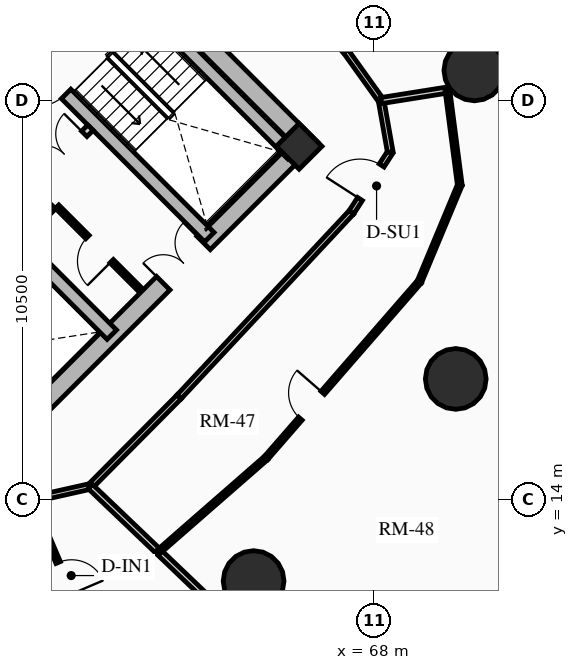
"""IFC4 building model, lengths in metres.
Left out: names, types, materials, properties, quantities, classifications, styles, units other than length and angle.
Written with IfcOpenShell. Run it as: python <this file> out.ifc"""

import sys

from ifc_helpers import new_model, si_unit, direction, frame, frame_2d, origin, origin_2d, place, context, subcontext, project, spatial, rectangle, circle, extrude, source, transform, mapped, element, fill, save


model = new_model("IFC4")
c1 = context("Model", 3, precision=1e-05, world=origin(), true_north=direction((0.0, 1.0)))
c2 = subcontext(c1, "Body", "Model", "MODEL_VIEW")
j1 = project(units=[si_unit("LENGTHUNIT", "METRE"), si_unit("PLANEANGLEUNIT", "RADIAN")], contexts=[c1])
p1 = place(None, origin())
s1 = spatial("IfcSite", under=j1, at=p1, CompositionType="ELEMENT")
p2 = place(p1, origin())
s2 = spatial("IfcBuilding", under=s1, at=p2, CompositionType="ELEMENT")
p3 = place(p2, frame((0.0, 0.0, 48.19)))
s3 = spatial("IfcBuildingStorey", under=s2, at=p3, CompositionType="ELEMENT", Elevation=48.19)
p4 = place(p3, frame((66.339, 23.227, 0.0), z_axis=(0.0, 0.0, 1.0), x_axis=(-0.707106781187, 0.707106781187, 0.0)))
e1 = element("IfcWall", 1, at=p4, inside=s3, PredefinedType="SHEAR", context=c2, shape_type="SweptSolid", body=[
    extrude(rectangle(XDim=14.3, YDim=0.5, at=frame_2d((7.15, 0.0))), origin(), (0.0, 0.0, 1.0), 2.91),
])
p5 = place(p3, frame((58.596, 15.838, 0.0), z_axis=(0.0, 0.0, 1.0), x_axis=(0.707106781187, 0.707106781187, 0.0)))
e2 = element("IfcWall", 2, at=p5, inside=s3, PredefinedType="SHEAR", context=c2, shape_type="SweptSolid", body=[
    extrude(rectangle(XDim=10.7, YDim=0.5, at=frame_2d((5.35, 0.0))), origin(), (0.0, 0.0, 1.0), 2.91),
])
m1 = source(origin(), c2, "Body", "SweptSolid", [
    extrude(rectangle(XDim=1.5, YDim=2.02, at=frame_2d((0.75, 1.01))), frame((0.0, 0.26, 0.0), z_axis=(0.0, -1.0, 0.0), x_axis=(1.0, 0.0, 0.0)), (0.0, 0.0, 1.0), 0.52),
])
p6 = place(p5, frame((5.45, 0.0, 0.0)))
e3 = element("IfcOpeningElement", 3, at=p6, cuts=e2, PredefinedType="OPENING", context=c2, shape_type="MappedRepresentation", body=[
    mapped(m1, transform((0.0, 0.0, 0.0), x_axis=(1.0, 0.0, 0.0), y_axis=(0.0, 1.0, 0.0), z_axis=(0.0, 0.0, 1.0), scale=1.0)),
])
p7 = place(p3, frame((61.096, 18.338, 0.0), z_axis=(0.0, 0.0, 1.0), x_axis=(-0.707106781187, 0.707106781187, 0.0)))
e4 = element("IfcWall", 4, at=p7, inside=s3, PredefinedType="SHEAR", context=c2, shape_type="SweptSolid", body=[
    extrude(rectangle(XDim=13.8, YDim=0.35, at=frame_2d((6.9, 0.0))), origin(), (0.0, 0.0, 1.0), 2.91),
])
m2 = source(origin(), c2, "Body", "SweptSolid", [
    extrude(rectangle(XDim=1.1, YDim=2.015, at=frame_2d((0.55, 1.007))), frame((0.0, 0.185, 0.0), z_axis=(0.0, -1.0, 0.0), x_axis=(1.0, 0.0, 0.0)), (0.0, 0.0, 1.0), 0.37),
])
p8 = place(p7, frame((4.9, 0.0, 0.0)))
e5 = element("IfcOpeningElement", 5, at=p8, cuts=e4, PredefinedType="OPENING", context=c2, shape_type="MappedRepresentation", body=[
    mapped(m2, transform((0.0, 0.0, 0.0), x_axis=(1.0, 0.0, 0.0), y_axis=(0.0, 1.0, 0.0), z_axis=(0.0, 0.0, 1.0), scale=1.0)),
])
m3 = source(origin(), c2, "Body", "SweptSolid", [
    extrude(rectangle(XDim=1.15, YDim=2.02, at=frame_2d((0.575, 1.01))), frame((0.0, 0.185, 0.0), z_axis=(0.0, -1.0, 0.0), x_axis=(1.0, 0.0, 0.0)), (0.0, 0.0, 1.0), 0.37),
])
p9 = place(p7, frame((7.32, 0.0, 0.0)))
e6 = element("IfcOpeningElement", 6, at=p9, cuts=e4, PredefinedType="OPENING", context=c2, shape_type="MappedRepresentation", body=[
    mapped(m3, transform((0.0, 0.0, 0.0), x_axis=(1.0, 0.0, 0.0), y_axis=(0.0, 1.0, 0.0), z_axis=(0.0, 0.0, 1.0), scale=1.0)),
])
p10 = place(p3, frame((63.662, 20.904, 0.0), z_axis=(0.0, 0.0, 1.0), x_axis=(-0.707106781187, 0.707106781187, 0.0)))
e7 = element("IfcWall", 7, at=p10, inside=s3, PredefinedType="SHEAR", context=c2, shape_type="SweptSolid", body=[
    extrude(rectangle(XDim=13.8, YDim=0.35, at=frame_2d((6.9, 0.0))), origin(), (0.0, 0.0, 1.0), 2.91),
])
p11 = place(p10, frame((10.025, 0.0, 0.0)))
e8 = element("IfcOpeningElement", 8, at=p11, cuts=e7, PredefinedType="OPENING", context=c2, shape_type="MappedRepresentation", body=[
    mapped(m2, transform((0.0, 0.0, 0.0), x_axis=(1.0, 0.0, 0.0), y_axis=(0.0, 1.0, 0.0), z_axis=(0.0, 0.0, 1.0), scale=1.0)),
])
p12 = place(p10, frame((12.025, 0.0, 0.0)))
e9 = element("IfcOpeningElement", 9, at=p12, cuts=e7, PredefinedType="OPENING", context=c2, shape_type="MappedRepresentation", body=[
    mapped(m2, transform((0.0, 0.0, 0.0), x_axis=(1.0, 0.0, 0.0), y_axis=(0.0, 1.0, 0.0), z_axis=(0.0, 0.0, 1.0), scale=1.0)),
])
p13 = place(p10, frame((5.33, 0.0, 0.0)))
e10 = element("IfcOpeningElement", 10, at=p13, cuts=e7, PredefinedType="OPENING", context=c2, shape_type="MappedRepresentation", body=[
    mapped(m3, transform((0.0, 0.0, 0.0), x_axis=(1.0, 0.0, 0.0), y_axis=(0.0, 1.0, 0.0), z_axis=(0.0, 0.0, 1.0), scale=1.0)),
])
p14 = place(p3, frame((65.847, 23.089, 0.0), z_axis=(0.0, 0.0, 1.0), x_axis=(-0.707106781187, 0.707106781187, 0.0)))
e11 = element("IfcWall", 11, at=p14, inside=s3, PredefinedType="SHEAR", context=c2, shape_type="SweptSolid", body=[
    extrude(rectangle(XDim=6.745, YDim=0.35, at=frame_2d((3.373, 0.0))), origin(), (0.0, 0.0, 1.0), 2.91),
])
p15 = place(p3, frame((58.893, 25.674, 0.0), z_axis=(0.0, 0.0, 1.0), x_axis=(0.707106781187, 0.707106781187, 0.0)))
e12 = element("IfcWall", 12, at=p15, inside=s3, PredefinedType="SHEAR", context=c2, shape_type="SweptSolid", body=[
    extrude(rectangle(XDim=3.285, YDim=0.35, at=frame_2d((1.643, 0.0))), origin(), (0.0, 0.0, 1.0), 2.91),
])
p16 = place(p3, frame((66.024, 23.294, 0.0), z_axis=(0.0, 0.0, 1.0), x_axis=(0.707106781187, 0.707106781187, 0.0)))
e13 = element("IfcColumn", 13, at=p16, inside=s3, PredefinedType="COLUMN", context=c2, shape_type="SweptSolid", body=[
    extrude(rectangle(XDim=0.85, YDim=0.85, at=origin_2d()), origin(), (0.0, 0.0, 1.0), 2.91),
])
for number, where, z_axis, x_axis in (
    (14, (64.827, 11.854, 0.0), (0.0, 0.0, 1.0), (1.0, 0.0, 0.0)),
    (15, (70.146, 17.173, 0.0), (0.0, 0.0, 1.0), (1.0, 0.0, 0.0)),
    (16, (70.635, 25.291, 0.0), (0.0, 0.0, 1.0), (1.0, 0.0, 0.0)),
):
    element("IfcColumn", number, at=place(p3, frame(where, z_axis=z_axis, x_axis=x_axis)), inside=s3, PredefinedType="USERDEFINED", context=c2, shape_type="SweptSolid", body=[
        extrude(circle(Radius=0.8, at=origin_2d()), origin(), (0.0, 0.0, 1.0), 2.91),
    ])
p17 = place(p3, frame((73.814, 15.031, 0.0), z_axis=(0.0, 0.0, 1.0), x_axis=(-0.559638693991, -0.828736708604, 0.0)))
e17 = element("IfcWall", 17, at=p17, inside=s3, PredefinedType="SOLIDWALL", context=c2, shape_type="SweptSolid", body=[
    extrude(rectangle(XDim=4.93, YDim=0.24, at=frame_2d((2.465, 0.0))), origin(), (0.0, 0.0, 1.0), 2.073),
])
m4 = source(origin(), c2, "Body", "SweptSolid", [
    extrude(rectangle(XDim=1.9, YDim=1.35, at=frame_2d((0.95, 0.675))), frame((0.0, 0.13, 0.0), z_axis=(0.0, -1.0, 0.0), x_axis=(1.0, 0.0, 0.0)), (0.0, 0.0, 1.0), 0.26),
])
p18 = place(p17, frame((1.515, 0.0, 0.65)))
e18 = element("IfcOpeningElement", 18, at=p18, cuts=e17, PredefinedType="OPENING", context=c2, shape_type="MappedRepresentation", body=[
    mapped(m4, transform((0.0, 0.0, 0.0), x_axis=(1.0, 0.0, 0.0), y_axis=(0.0, 1.0, 0.0), z_axis=(0.0, 0.0, 1.0), scale=1.0)),
])
p19 = place(p3, frame((58.214, 21.467, 0.0), z_axis=(0.0, 0.0, 1.0), x_axis=(0.707106781187, 0.707106781187, 0.0)))
e19 = element("IfcWall", 19, at=p19, inside=s3, PredefinedType="PARTITIONING", context=c2, shape_type="SweptSolid", body=[
    extrude(rectangle(XDim=3.28, YDim=0.2, at=frame_2d((1.64, 0.0))), origin(), (0.0, 0.0, 1.0), 2.635),
])
m5 = source(origin(), c2, "Body", "SweptSolid", [
    extrude(rectangle(XDim=1.5, YDim=2.02, at=frame_2d((0.75, 1.01))), frame((0.0, 0.11, 0.0), z_axis=(0.0, -1.0, 0.0), x_axis=(1.0, 0.0, 0.0)), (0.0, 0.0, 1.0), 0.22),
])
p20 = place(p19, frame((1.55, 0.0, 0.0)))
e20 = element("IfcOpeningElement", 20, at=p20, cuts=e19, PredefinedType="OPENING", context=c2, shape_type="MappedRepresentation", body=[
    mapped(m5, transform((0.0, 0.0, 0.0), x_axis=(1.0, 0.0, 0.0), y_axis=(0.0, 1.0, 0.0), z_axis=(0.0, 0.0, 1.0), scale=1.0)),
])
p21 = place(p3, frame((61.835, 19.529, 0.0), z_axis=(0.0, 0.0, 1.0), x_axis=(-0.707146413884, 0.707067146267, 0.0)))
e21 = element("IfcWall", 21, at=p21, inside=s3, PredefinedType="PARTITIONING", context=c2, shape_type="SweptSolid", body=[
    extrude(rectangle(XDim=3.08, YDim=0.125, at=frame_2d((1.54, 0.0))), origin(), (0.0, 0.0, 1.0), 2.635),
])
m6 = source(origin(), c2, "Body", "SweptSolid", [
    extrude(rectangle(XDim=0.9, YDim=2.005, at=frame_2d((0.45, 1.002))), frame((0.0, 0.073, 0.0), z_axis=(0.0, -1.0, 0.0), x_axis=(1.0, 0.0, 0.0)), (0.0, 0.0, 1.0), 0.145),
])
p22 = place(p21, frame((1.05, 0.0, 0.0)))
e22 = element("IfcOpeningElement", 22, at=p22, cuts=e21, PredefinedType="OPENING", context=c2, shape_type="MappedRepresentation", body=[
    mapped(m6, transform((0.0, 0.0, 0.0), x_axis=(1.0, 0.0, 0.0), y_axis=(0.0, 1.0, 0.0), z_axis=(0.0, 0.0, 1.0), scale=1.0)),
])
p23 = place(p3, frame((58.794, 20.915, 0.0), z_axis=(0.0, 0.0, 1.0), x_axis=(0.707106781187, 0.707106781187, 0.0)))
e23 = element("IfcWall", 23, at=p23, inside=s3, PredefinedType="PARTITIONING", context=c2, shape_type="SweptSolid", body=[
    extrude(rectangle(XDim=1.1, YDim=0.125, at=frame_2d((0.55, 0.0))), origin(), (0.0, 0.0, 1.0), 2.635),
])
p24 = place(p3, frame((58.975, 13.996, 0.0), z_axis=(0.0, 0.0, 1.0), x_axis=(0.975700857392, 0.219106907431, 0.0)))
e24 = element("IfcWall", 24, at=p24, inside=s3, PredefinedType="PARTITIONING", context=c2, shape_type="SweptSolid", body=[
    extrude(rectangle(XDim=1.591, YDim=0.15, at=frame_2d((0.795, 0.0))), origin(), (0.0, 0.0, 1.0), 2.205),
])
p25 = place(p3, frame((60.528, 14.344, 0.0), z_axis=(0.0, 0.0, 1.0), x_axis=(0.704381645997, 0.709821454158, 0.0)))
e25 = element("IfcWall", 25, at=p25, inside=s3, PredefinedType="PARTITIONING", context=c2, shape_type="SweptSolid", body=[
    extrude(rectangle(XDim=3.321, YDim=0.15, at=frame_2d((1.661, 0.0))), origin(), (0.0, 0.0, 1.0), 2.159),
])
p26 = place(p3, frame((62.867, 16.702, 0.0), z_axis=(0.0, 0.0, 1.0), x_axis=(0.682449206191, 0.73093302085, 0.0)))
e26 = element("IfcWall", 26, at=p26, inside=s3, PredefinedType="PARTITIONING", context=c2, shape_type="SweptSolid", body=[
    extrude(rectangle(XDim=6.642, YDim=0.15, at=frame_2d((3.321, 0.0))), origin(), (0.0, 0.0, 1.0), 2.159),
])
p27 = place(p3, frame((67.4, 21.556, 0.0), z_axis=(0.0, 0.0, 1.0), x_axis=(0.542247692187, 0.840218686009, 0.0)))
e27 = element("IfcWall", 27, at=p27, inside=s3, PredefinedType="PARTITIONING", context=c2, shape_type="SweptSolid", body=[
    extrude(rectangle(XDim=1.887, YDim=0.15, at=frame_2d((0.943, 0.0))), origin(), (0.0, 0.0, 1.0), 2.205),
])
m7 = source(origin(), c2, "Body", "SweptSolid", [
    extrude(rectangle(XDim=1.05, YDim=2.015, at=frame_2d((0.525, 1.007))), frame((0.0, 0.085, 0.0), z_axis=(0.0, -1.0, 0.0), x_axis=(1.0, 0.0, 0.0)), (0.0, 0.0, 1.0), 0.17),
])
p28 = place(p27, frame((0.419, 0.0, 0.0)))
e28 = element("IfcOpeningElement", 28, at=p28, cuts=e27, PredefinedType="OPENING", context=c2, shape_type="MappedRepresentation", body=[
    mapped(m7, transform((0.0, 0.0, 0.0), x_axis=(1.0, 0.0, 0.0), y_axis=(0.0, 1.0, 0.0), z_axis=(0.0, 0.0, 1.0), scale=1.0)),
])
p29 = place(p3, frame((68.423, 23.142, 0.0), z_axis=(0.0, 0.0, 1.0), x_axis=(-0.174796562349, 0.984604571283, 0.0)))
e29 = element("IfcWall", 29, at=p29, inside=s3, PredefinedType="PARTITIONING", context=c2, shape_type="SweptSolid", body=[
    extrude(rectangle(XDim=1.377, YDim=0.15, at=frame_2d((0.688, 0.0))), origin(), (0.0, 0.0, 1.0), 2.159),
])
p30 = place(p3, frame((68.182, 24.498, 0.0), z_axis=(0.0, 0.0, 1.0), x_axis=(-0.582532339525, 0.812807525437, 0.0)))
e30 = element("IfcWall", 30, at=p30, inside=s3, PredefinedType="PARTITIONING", context=c2, shape_type="SweptSolid", body=[
    extrude(rectangle(XDim=1.605, YDim=0.15, at=frame_2d((0.803, 0.0))), origin(), (0.0, 0.0, 1.0), 2.205),
])
p31 = place(p3, frame((67.247, 25.802, 0.0), z_axis=(0.0, 0.0, 1.0), x_axis=(-0.696771261687, 0.71729339108, 0.0)))
e31 = element("IfcWall", 31, at=p31, inside=s3, PredefinedType="PARTITIONING", context=c2, shape_type="SweptSolid", body=[
    extrude(rectangle(XDim=5.972, YDim=0.15, at=frame_2d((2.986, 0.0))), origin(), (0.0, 0.0, 1.0), 2.635),
])
m8 = source(origin(), c2, "Body", "SweptSolid", [
    extrude(rectangle(XDim=1.0, YDim=2.015, at=frame_2d((0.5, 1.007))), frame((0.0, 0.085, 0.0), z_axis=(0.0, -1.0, 0.0), x_axis=(1.0, 0.0, 0.0)), (0.0, 0.0, 1.0), 0.17),
])
p32 = place(p31, frame((2.486, 0.0, 0.0)))
e32 = element("IfcOpeningElement", 32, at=p32, cuts=e31, PredefinedType="OPENING", context=c2, shape_type="MappedRepresentation", body=[
    mapped(m8, transform((0.0, 0.0, 0.0), x_axis=(1.0, 0.0, 0.0), y_axis=(0.0, 1.0, 0.0), z_axis=(0.0, 0.0, 1.0), scale=1.0)),
])
p33 = place(p3, frame((60.528, 14.344, 0.0), z_axis=(0.0, 0.0, 1.0), x_axis=(0.723320016743, -0.690512963947, 0.0)))
e33 = element("IfcWall", 33, at=p33, inside=s3, PredefinedType="PARTITIONING", context=c2, shape_type="SweptSolid", body=[
    extrude(rectangle(XDim=8.893, YDim=0.16, at=frame_2d((4.446, 0.0))), origin(), (0.0, 0.0, 1.0), 2.073),
])
p34 = place(p3, frame((68.182, 24.498, 0.0), z_axis=(0.0, 0.0, 1.0), x_axis=(0.987550107246, 0.157304754152, 0.0)))
e34 = element("IfcWall", 34, at=p34, inside=s3, PredefinedType="PARTITIONING", context=c2, shape_type="SweptSolid", body=[
    extrude(rectangle(XDim=6.304, YDim=0.16, at=frame_2d((3.152, 0.0))), origin(), (0.0, 0.0, 1.0), 2.073),
])
p35 = place(p3, frame((58.975, 13.996, 0.0), z_axis=(0.0, 0.0, 1.0), x_axis=(0.393755664375, -0.919215141723, 0.0)))
e35 = element("IfcWall", 35, at=p35, inside=s3, PredefinedType="PARTITIONING", context=c2, shape_type="SweptSolid", body=[
    extrude(rectangle(XDim=7.563, YDim=0.125, at=frame_2d((3.782, 0.0))), origin(), (0.0, 0.0, 1.0), 2.073),
])
p36 = place(p35, frame((1.8, 0.0, 0.0)))
e36 = element("IfcOpeningElement", 36, at=p36, cuts=e35, PredefinedType="OPENING", context=c2, shape_type="MappedRepresentation", body=[
    mapped(m6, transform((0.0, 0.0, 0.0), x_axis=(1.0, 0.0, 0.0), y_axis=(0.0, 1.0, 0.0), z_axis=(0.0, 0.0, 1.0), scale=1.0)),
])
p37 = place(p3, frame((62.329, 12.625, 0.0), z_axis=(0.0, 0.0, 1.0), x_axis=(0.753237140985, 0.657749047465, 0.0)))
e37 = element("IfcWall", 37, at=p37, inside=s3, PredefinedType="PARTITIONING", context=c2, shape_type="SweptSolid", body=[
    extrude(rectangle(XDim=3.753, YDim=0.125, at=frame_2d((1.877, 0.0))), origin(), (0.0, 0.0, 1.0), 2.159),
])
p38 = place(p3, frame((65.156, 15.094, 0.0), z_axis=(0.0, 0.0, 1.0), x_axis=(0.656356662483, 0.754450748302, 0.0)))
e38 = element("IfcWall", 38, at=p38, inside=s3, PredefinedType="PARTITIONING", context=c2, shape_type="SweptSolid", body=[
    extrude(rectangle(XDim=6.147, YDim=0.125, at=frame_2d((3.074, 0.0))), origin(), (0.0, 0.0, 1.0), 2.159),
])
p39 = place(p38, frame((1.372, 0.0, 0.0)))
e39 = element("IfcOpeningElement", 39, at=p39, cuts=e38, PredefinedType="OPENING", context=c2, shape_type="MappedRepresentation", body=[
    mapped(m6, transform((0.0, 0.0, 0.0), x_axis=(1.0, 0.0, 0.0), y_axis=(0.0, 1.0, 0.0), z_axis=(0.0, 0.0, 1.0), scale=1.0)),
])
p40 = place(p3, frame((69.191, 19.732, 0.0), z_axis=(0.0, 0.0, 1.0), x_axis=(0.385156247749, 0.922851377427, 0.0)))
e40 = element("IfcWall", 40, at=p40, inside=s3, PredefinedType="PARTITIONING", context=c2, shape_type="SweptSolid", body=[
    extrude(rectangle(XDim=2.756, YDim=0.125, at=frame_2d((1.378, 0.0))), origin(), (0.0, 0.0, 1.0), 2.205),
])
p41 = place(p3, frame((70.252, 22.275, 0.0), z_axis=(0.0, 0.0, 1.0), x_axis=(-0.129645482902, 0.991560411051, 0.0)))
e41 = element("IfcWall", 41, at=p41, inside=s3, PredefinedType="PARTITIONING", context=c2, shape_type="SweptSolid", body=[
    extrude(rectangle(XDim=2.521, YDim=0.125, at=frame_2d((1.261, 0.0))), origin(), (0.0, 0.0, 1.0), 2.635),
])
m9 = source(origin(), c2, "Body", "SweptSolid", [
    extrude(rectangle(XDim=1.15, YDim=2.02, at=frame_2d((0.575, 1.01))), frame((0.0, 0.025, 0.0), z_axis=(0.0, -1.0, 0.0), x_axis=(1.0, 0.0, 0.0)), (0.0, 0.0, 1.0), 0.05),
])
p42 = place(p13, origin())
e42 = element("IfcDoor", 42, at=p42, inside=s3, OperationType="SINGLE_SWING_RIGHT", PredefinedType="DOOR", context=c2, shape_type="MappedRepresentation", body=[
    mapped(m9, transform((0.0, 0.0, 0.0), x_axis=(1.0, 0.0, 0.0), y_axis=(0.0, 1.0, 0.0), z_axis=(0.0, 0.0, 1.0), scale=1.0)),
])
fill(e10, e42)
m10 = source(origin(), c2, "Body", "SweptSolid", [
    extrude(rectangle(XDim=1.5, YDim=2.02, at=frame_2d((0.75, 1.01))), frame((0.0, 0.025, 0.0), z_axis=(0.0, -1.0, 0.0), x_axis=(1.0, 0.0, 0.0)), (0.0, 0.0, 1.0), 0.05),
])
p43 = place(p6, origin())
e43 = element("IfcDoor", 43, at=p43, inside=s3, OperationType="DOUBLE_DOOR_SINGLE_SWING", PredefinedType="DOOR", context=c2, shape_type="MappedRepresentation", body=[
    mapped(m10, transform((0.0, 0.0, 0.0), x_axis=(1.0, 0.0, 0.0), y_axis=(0.0, 1.0, 0.0), z_axis=(0.0, 0.0, 1.0), scale=1.0)),
])
fill(e3, e43)
p44 = place(p20, origin())
e44 = element("IfcDoor", 44, at=p44, inside=s3, OperationType="DOUBLE_DOOR_SINGLE_SWING", PredefinedType="DOOR", context=c2, shape_type="MappedRepresentation", body=[
    mapped(m10, transform((0.0, 0.0, 0.0), x_axis=(1.0, 0.0, 0.0), y_axis=(0.0, 1.0, 0.0), z_axis=(0.0, 0.0, 1.0), scale=1.0)),
])
fill(e20, e44)
m11 = source(origin(), c2, "Body", "SweptSolid", [
    extrude(rectangle(XDim=0.9, YDim=2.005, at=frame_2d((0.45, 1.002))), frame((0.0, 0.025, 0.0), z_axis=(0.0, -1.0, 0.0), x_axis=(1.0, 0.0, 0.0)), (0.0, 0.0, 1.0), 0.05),
])
p45 = place(p22, origin())
e45 = element("IfcDoor", 45, at=p45, inside=s3, OperationType="SINGLE_SWING_LEFT", PredefinedType="DOOR", context=c2, shape_type="MappedRepresentation", body=[
    mapped(m11, transform((0.0, 0.0, 0.0), x_axis=(1.0, 0.0, 0.0), y_axis=(0.0, 1.0, 0.0), z_axis=(0.0, 0.0, 1.0), scale=1.0)),
])
fill(e22, e45)
p46 = place(p36, origin())
e46 = element("IfcDoor", 46, at=p46, inside=s3, OperationType="SINGLE_SWING_RIGHT", PredefinedType="DOOR", context=c2, shape_type="MappedRepresentation", body=[
    mapped(m11, transform((0.0, 0.0, 0.0), x_axis=(1.0, 0.0, 0.0), y_axis=(0.0, 1.0, 0.0), z_axis=(0.0, 0.0, 1.0), scale=1.0)),
])
fill(e36, e46)
m12 = source(origin(), c2, "Body", "SweptSolid", [
    extrude(rectangle(XDim=1.05, YDim=2.015, at=frame_2d((0.525, 1.007))), frame((0.0, 0.025, 0.0), z_axis=(0.0, -1.0, 0.0), x_axis=(1.0, 0.0, 0.0)), (0.0, 0.0, 1.0), 0.05),
])
p47 = place(p28, origin())
e47 = element("IfcDoor", 47, at=p47, inside=s3, OperationType="SINGLE_SWING_LEFT", PredefinedType="DOOR", context=c2, shape_type="MappedRepresentation", body=[
    mapped(m12, transform((0.0, 0.0, 0.0), x_axis=(1.0, 0.0, 0.0), y_axis=(0.0, 1.0, 0.0), z_axis=(0.0, 0.0, 1.0), scale=1.0)),
])
fill(e28, e47)
p48 = place(p39, origin())
e48 = element("IfcDoor", 48, at=p48, inside=s3, OperationType="SINGLE_SWING_RIGHT", PredefinedType="DOOR", context=c2, shape_type="MappedRepresentation", body=[
    mapped(m11, transform((0.0, 0.0, 0.0), x_axis=(1.0, 0.0, 0.0), y_axis=(0.0, 1.0, 0.0), z_axis=(0.0, 0.0, 1.0), scale=1.0)),
])
fill(e39, e48)
save(model, sys.argv[1])
